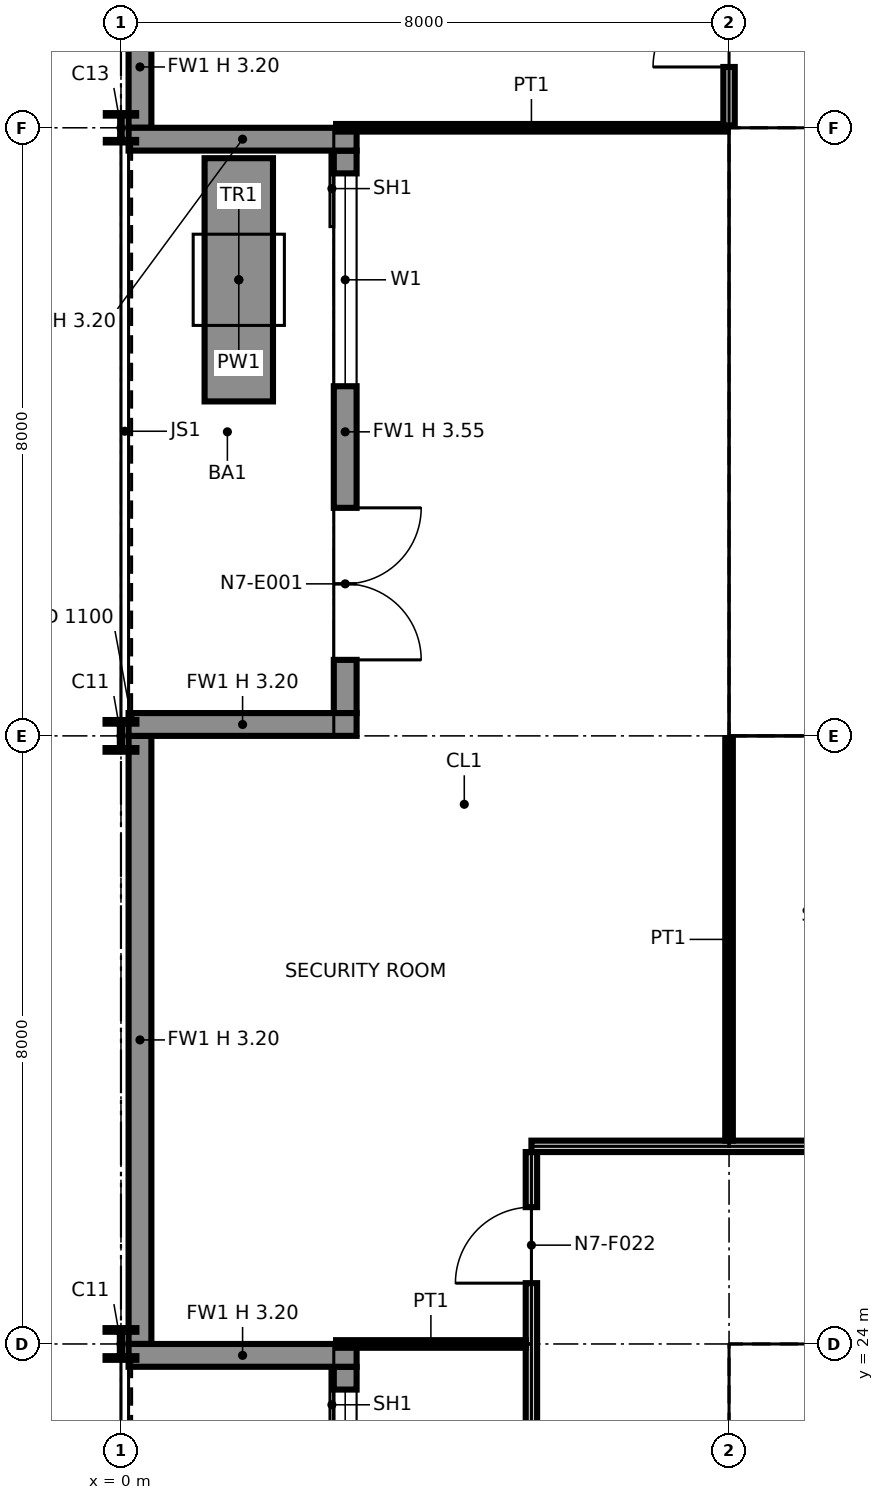
"""IFC4 building model, lengths in metres.
Left out: names, types, materials, properties, quantities, classifications, styles, units other than length and angle.
Written with IfcOpenShell. Run it as: python <this file> out.ifc"""

import sys

from ifc_helpers import new_model, si_unit, direction, frame, frame_2d, origin, origin_2d, place, context, subcontext, project, spatial, polyline, rectangle, i_section, outline, extrude, element, fill, save


model = new_model("IFC4")
c1 = context("Model", 3, precision=1e-05, world=origin(), true_north=direction((0.0, 1.0)))
c2 = subcontext(c1, "Body", "Model", "MODEL_VIEW")
j1 = project(units=[si_unit("LENGTHUNIT", "METRE"), si_unit("PLANEANGLEUNIT", "RADIAN")], contexts=[c1])
p1 = place(None, origin())
s1 = spatial("IfcSite", under=j1, at=p1, CompositionType="ELEMENT")
p2 = place(p1, origin())
s2 = spatial("IfcBuilding", under=s1, at=p2, CompositionType="ELEMENT")
p3 = place(p2, frame((0.0, 0.0, 109.6)))
s3 = spatial("IfcBuildingStorey", under=s2, at=p3, CompositionType="ELEMENT", Elevation=109.6)
for number, where, z_axis, x_axis in (
    (1, (0.0, 24.0, 0.0), (0.0, 0.0, 1.0), (1.0, 0.0, 0.0)),
    (2, (0.0, 32.0, 0.0), (0.0, 0.0, 1.0), (1.0, 0.0, 0.0)),
):
    element("IfcColumn", number, at=place(p3, frame(where, z_axis=z_axis, x_axis=x_axis)), inside=s3, PredefinedType="COLUMN", context=c2, shape_type="SweptSolid", body=[
        extrude(i_section(OverallWidth=0.406, OverallDepth=0.417, WebThickness=0.03, FlangeThickness=0.048, at=origin_2d()), origin(), (0.0, 0.0, 1.0), 4.15),
    ])
p4 = place(p3, frame((0.0, 40.0, 0.0), z_axis=(0.0, 0.0, 1.0), x_axis=(1.0, 0.0, 0.0)))
e3 = element("IfcColumn", 3, at=p4, inside=s3, PredefinedType="COLUMN", context=c2, shape_type="SweptSolid", body=[
    extrude(i_section(OverallWidth=0.399, OverallDepth=0.386, WebThickness=0.021, FlangeThickness=0.033, at=origin_2d()), origin(), (0.0, 0.0, 1.0), 4.15),
])
p5 = place(p3, frame((8.0, 24.0, 0.0), z_axis=(0.0, 0.0, 1.0), x_axis=(1.0, 0.0, 0.0)))
e4 = element("IfcColumn", 4, at=p5, inside=s3, PredefinedType="COLUMN", context=c2, shape_type="SweptSolid", body=[
    extrude(i_section(OverallWidth=0.411, OverallDepth=0.434, WebThickness=0.036, FlangeThickness=0.057, at=origin_2d()), origin(), (0.0, 0.0, 1.0), 4.15),
])
for number, where, z_axis, x_axis in (
    (5, (8.0, 32.0, 0.0), (0.0, 0.0, 1.0), (1.0, 0.0, 0.0)),
    (6, (8.0, 40.0, 0.0), (0.0, 0.0, 1.0), (1.0, 0.0, 0.0)),
):
    element("IfcColumn", number, at=place(p3, frame(where, z_axis=z_axis, x_axis=x_axis)), inside=s3, PredefinedType="COLUMN", context=c2, shape_type="SweptSolid", body=[
        extrude(i_section(OverallWidth=0.373, OverallDepth=0.368, WebThickness=0.015, FlangeThickness=0.024, at=origin_2d()), origin(), (0.0, 0.0, 1.0), 4.15),
    ])
p6 = place(p3, frame((0.25, 41.6, 0.0), z_axis=(0.0, 0.0, 1.0), x_axis=(0.0, -1.0, 0.0)))
e7 = element("IfcWall", 7, at=p6, inside=s3, PredefinedType="SOLIDWALL", context=c2, shape_type="SweptSolid", body=[
    extrude(rectangle(XDim=1.6, YDim=0.3, at=frame_2d((0.8, 0.0))), origin(), (0.0, 0.0, 1.0), 3.199),
])
p7 = place(p3, frame((2.95, 39.7, 0.0), z_axis=(0.0, 0.0, 1.0), x_axis=(0.0, -1.0, 0.0)))
e8 = element("IfcWall", 8, at=p7, inside=s3, PredefinedType="SOLIDWALL", context=c2, shape_type="SweptSolid", body=[
    extrude(rectangle(XDim=7.4, YDim=0.3, at=frame_2d((3.7, 0.0))), origin(), (0.0, 0.0, 1.0), 3.547),
])
p8 = place(p7, frame((0.3, 0.0, 0.9)))
e9 = element("IfcOpeningElement", 9, at=p8, cuts=e8, PredefinedType="OPENING", context=c2, shape_type="SweptSolid", body=[
    extrude(rectangle(XDim=2.8, YDim=2.2, at=frame_2d((1.4, 1.1))), frame((0.0, 0.16, 0.0), z_axis=(0.0, -1.0, 0.0), x_axis=(1.0, 0.0, 0.0)), (0.0, 0.0, 1.0), 0.32),
])
p9 = place(p7, frame((4.7, 0.0, 0.0)))
e10 = element("IfcOpeningElement", 10, at=p9, cuts=e8, PredefinedType="OPENING", context=c2, shape_type="SweptSolid", body=[
    extrude(rectangle(XDim=2.0, YDim=2.4, at=frame_2d((1.0, 1.2))), frame((0.0, 0.16, 0.0), z_axis=(0.0, -1.0, 0.0), x_axis=(1.0, 0.0, 0.0)), (0.0, 0.0, 1.0), 0.32),
])
for number, where, z_axis, x_axis in (
    (11, (0.1, 39.85, 0.0), (0.0, 0.0, 1.0), (1.0, 0.0, 0.0)),
    (12, (0.1, 32.15, 0.0), (0.0, 0.0, 1.0), (1.0, 0.0, 0.0)),
):
    element("IfcWall", number, at=place(p3, frame(where, z_axis=z_axis, x_axis=x_axis)), inside=s3, PredefinedType="SOLIDWALL", context=c2, shape_type="SweptSolid", body=[
        extrude(rectangle(XDim=3.0, YDim=0.3, at=frame_2d((1.5, 0.0))), origin(), (0.0, 0.0, 1.0), 3.199),
    ])
p10 = place(p3, frame((0.25, 32.0, 0.0), z_axis=(0.0, 0.0, 1.0), x_axis=(0.0, -1.0, 0.0)))
e13 = element("IfcWall", 13, at=p10, inside=s3, PredefinedType="SOLIDWALL", context=c2, shape_type="SweptSolid", body=[
    extrude(rectangle(XDim=8.0, YDim=0.3, at=frame_2d((4.0, 0.0))), origin(), (0.0, 0.0, 1.0), 3.199),
])
p11 = place(p3, frame((2.95, 23.7, 0.0), z_axis=(0.0, 0.0, 1.0), x_axis=(0.0, -1.0, 0.0)))
e14 = element("IfcWall", 14, at=p11, inside=s3, PredefinedType="SOLIDWALL", context=c2, shape_type="SweptSolid", body=[
    extrude(rectangle(XDim=7.4, YDim=0.3, at=frame_2d((3.7, 0.0))), origin(), (0.0, 0.0, 1.0), 3.547),
])
p12 = place(p11, frame((0.3, 0.0, 0.9)))
e15 = element("IfcOpeningElement", 15, at=p12, cuts=e14, PredefinedType="OPENING", context=c2, shape_type="SweptSolid", body=[
    extrude(rectangle(XDim=2.8, YDim=2.2, at=frame_2d((1.4, 1.1))), frame((0.0, 0.16, 0.0), z_axis=(0.0, -1.0, 0.0), x_axis=(1.0, 0.0, 0.0)), (0.0, 0.0, 1.0), 0.32),
])
p13 = place(p11, frame((4.7, 0.0, 0.0)))
e16 = element("IfcOpeningElement", 16, at=p13, cuts=e14, PredefinedType="OPENING", context=c2, shape_type="SweptSolid", body=[
    extrude(rectangle(XDim=2.0, YDim=2.4, at=frame_2d((1.0, 1.2))), frame((0.0, 0.16, 0.0), z_axis=(0.0, -1.0, 0.0), x_axis=(1.0, 0.0, 0.0)), (0.0, 0.0, 1.0), 0.32),
])
p14 = place(p3, frame((0.1, 23.85, 0.0), z_axis=(0.0, 0.0, 1.0), x_axis=(1.0, 0.0, 0.0)))
e17 = element("IfcWall", 17, at=p14, inside=s3, PredefinedType="SOLIDWALL", context=c2, shape_type="SweptSolid", body=[
    extrude(rectangle(XDim=3.0, YDim=0.3, at=frame_2d((1.5, 0.0))), origin(), (0.0, 0.0, 1.0), 3.199),
])
p15 = place(p3, frame((1.55, 39.6, 0.0), z_axis=(0.0, 0.0, 1.0), x_axis=(0.0, -1.0, 0.0)))
e18 = element("IfcWall", 18, at=p15, inside=s3, PredefinedType="SOLIDWALL", context=c2, shape_type="SweptSolid", body=[
    extrude(rectangle(XDim=3.2, YDim=0.9, at=frame_2d((1.6, 0.0))), origin(), (0.0, 0.0, 1.0), 0.6),
])
p16 = place(p3, frame((8.75, 8.85, 0.0), z_axis=(0.0, 0.0, 1.0), x_axis=(0.0, 1.0, 0.0)))
e19 = element("IfcWall", 19, at=p16, inside=s3, PredefinedType="PARTITIONING", context=c2, shape_type="SweptSolid", body=[
    extrude(outline(polyline([(0.0, 0.0), (14.3, 0.0), (14.3, 4.15), (10.269, 4.15), (10.268, 3.542), (10.032, 3.542), (10.031, 4.15), (7.289, 4.15), (7.288, 3.382), (7.012, 3.382), (7.011, 4.15), (0.0, 4.15), (0.0, 0.0)])), frame((0.0, 0.1, 0.0), z_axis=(0.0, -1.0, 0.0), x_axis=(1.0, 0.0, 0.0)), (0.0, 0.0, 1.0), 0.2),
])
p17 = place(p16, frame((8.3, 0.0, 0.0)))
e20 = element("IfcOpeningElement", 20, at=p17, cuts=e19, PredefinedType="OPENING", context=c2, shape_type="SweptSolid", body=[
    extrude(rectangle(XDim=1.8, YDim=2.1, at=frame_2d((0.9, 1.05))), frame((0.0, 0.11, 0.0), z_axis=(0.0, -1.0, 0.0), x_axis=(1.0, 0.0, 0.0)), (0.0, 0.0, 1.0), 0.22),
])
p18 = place(p3, frame((8.65, 23.25, 0.0), z_axis=(0.0, 0.0, 1.0), x_axis=(1.0, 0.0, 0.0)))
e21 = element("IfcWall", 21, at=p18, inside=s3, PredefinedType="PARTITIONING", context=c2, shape_type="SweptSolid", body=[
    extrude(outline(polyline([(0.0, 0.0), (14.7, 0.0), (14.7, 4.15), (7.489, 4.15), (7.488, 3.382), (7.212, 3.382), (7.211, 4.15), (0.0, 4.15), (0.0, 0.0)])), frame((0.0, 0.1, 0.0), z_axis=(0.0, -1.0, 0.0), x_axis=(1.0, 0.0, 0.0)), (0.0, 0.0, 1.0), 0.2),
])
p19 = place(p3, frame((8.65, 32.75, 0.0), z_axis=(0.0, 0.0, 1.0), x_axis=(1.0, 0.0, 0.0)))
e22 = element("IfcWall", 22, at=p19, inside=s3, PredefinedType="PARTITIONING", context=c2, shape_type="SweptSolid", body=[
    extrude(outline(polyline([(0.0, 0.0), (14.7, 0.0), (14.7, 4.15), (7.489, 4.15), (7.488, 3.382), (7.212, 3.382), (7.211, 4.15), (0.0, 4.15), (0.0, 0.0)])), frame((0.0, 0.1, 0.0), z_axis=(0.0, -1.0, 0.0), x_axis=(1.0, 0.0, 0.0)), (0.0, 0.0, 1.0), 0.2),
])
p20 = place(p19, frame((4.05, 0.0, 0.0)))
e23 = element("IfcOpeningElement", 23, at=p20, cuts=e22, PredefinedType="OPENING", context=c2, shape_type="SweptSolid", body=[
    extrude(rectangle(XDim=1.8, YDim=2.1, at=frame_2d((0.9, 1.05))), frame((0.0, 0.11, 0.0), z_axis=(0.0, -1.0, 0.0), x_axis=(1.0, 0.0, 0.0)), (0.0, 0.0, 1.0), 0.22),
])
p21 = place(p19, frame((8.35, 0.0, 0.0)))
e24 = element("IfcOpeningElement", 24, at=p21, cuts=e22, PredefinedType="OPENING", context=c2, shape_type="SweptSolid", body=[
    extrude(rectangle(XDim=1.4, YDim=2.1, at=frame_2d((0.7, 1.05))), frame((0.0, 0.11, 0.0), z_axis=(0.0, -1.0, 0.0), x_axis=(1.0, 0.0, 0.0)), (0.0, 0.0, 1.0), 0.22),
])
p22 = place(p19, frame((10.85, 0.0, 0.0)))
e25 = element("IfcOpeningElement", 25, at=p22, cuts=e22, PredefinedType="OPENING", context=c2, shape_type="SweptSolid", body=[
    extrude(rectangle(XDim=1.4, YDim=2.1, at=frame_2d((0.7, 1.05))), frame((0.0, 0.11, 0.0), z_axis=(0.0, -1.0, 0.0), x_axis=(1.0, 0.0, 0.0)), (0.0, 0.0, 1.0), 0.22),
])
p23 = place(p3, frame((8.75, 32.85, 0.0), z_axis=(0.0, 0.0, 1.0), x_axis=(0.0, 1.0, 0.0)))
e26 = element("IfcWall", 26, at=p23, inside=s3, PredefinedType="PARTITIONING", context=c2, shape_type="SweptSolid", body=[
    extrude(outline(polyline([(0.0, 0.0), (6.3, 0.0), (6.3, 4.15), (3.269, 4.15), (3.268, 3.542), (3.032, 3.542), (3.031, 4.15), (0.0, 4.15), (0.0, 0.0)])), frame((0.0, 0.1, 0.0), z_axis=(0.0, -1.0, 0.0), x_axis=(1.0, 0.0, 0.0)), (0.0, 0.0, 1.0), 0.2),
])
p24 = place(p3, frame((8.65, 39.25, 0.0), z_axis=(0.0, 0.0, 1.0), x_axis=(1.0, 0.0, 0.0)))
e27 = element("IfcWall", 27, at=p24, inside=s3, PredefinedType="PARTITIONING", context=c2, shape_type="SweptSolid", body=[
    extrude(outline(polyline([(0.0, 0.0), (14.7, 0.0), (14.7, 4.15), (7.489, 4.15), (7.488, 3.382), (7.212, 3.382), (7.211, 4.15), (0.0, 4.15), (0.0, 0.0)])), frame((0.0, 0.1, 0.0), z_axis=(0.0, -1.0, 0.0), x_axis=(1.0, 0.0, 0.0)), (0.0, 0.0, 1.0), 0.2),
])
p25 = place(p3, frame((8.85, 34.875, 0.0), z_axis=(0.0, 0.0, 1.0), x_axis=(1.0, 0.0, 0.0)))
e28 = element("IfcWall", 28, at=p25, inside=s3, PredefinedType="PARTITIONING", context=c2, shape_type="SweptSolid", body=[
    extrude(rectangle(XDim=2.1, YDim=0.15, at=frame_2d((1.05, 0.0))), origin(), (0.0, 0.0, 1.0), 4.15),
])
p26 = place(p3, frame((8.85, 36.5, 0.0), z_axis=(0.0, 0.0, 1.0), x_axis=(1.0, 0.0, 0.0)))
e29 = element("IfcWall", 29, at=p26, inside=s3, PredefinedType="PARTITIONING", context=c2, shape_type="SweptSolid", body=[
    extrude(outline(polyline([(0.0, 0.0), (7.45, 0.0), (7.45, 4.15), (7.289, 4.15), (7.288, 3.382), (7.012, 3.382), (7.011, 4.15), (0.0, 4.15), (0.0, 0.0)])), frame((0.0, 0.1, 0.0), z_axis=(0.0, -1.0, 0.0), x_axis=(1.0, 0.0, 0.0)), (0.0, 0.0, 1.0), 0.2),
])
p27 = place(p3, frame((5.4, 5.4, 0.0), z_axis=(0.0, 0.0, 1.0), x_axis=(0.0, 1.0, 0.0)))
e30 = element("IfcWall", 30, at=p27, inside=s3, PredefinedType="PARTITIONING", context=c2, shape_type="SweptSolid", body=[
    extrude(rectangle(XDim=21.125, YDim=0.15, at=frame_2d((10.562, 0.0))), origin(), (0.0, 0.0, 1.0), 3.194),
])
p28 = place(p27, frame((6.1, 0.0, 0.0)))
e31 = element("IfcOpeningElement", 31, at=p28, cuts=e30, PredefinedType="OPENING", context=c2, shape_type="SweptSolid", body=[
    extrude(rectangle(XDim=1.0, YDim=2.1, at=frame_2d((0.5, 1.05))), frame((0.0, 0.085, 0.0), z_axis=(0.0, -1.0, 0.0), x_axis=(1.0, 0.0, 0.0)), (0.0, 0.0, 1.0), 0.17),
])
p29 = place(p27, frame((11.825, 0.0, 0.0)))
e32 = element("IfcOpeningElement", 32, at=p29, cuts=e30, PredefinedType="OPENING", context=c2, shape_type="SweptSolid", body=[
    extrude(rectangle(XDim=1.0, YDim=2.1, at=frame_2d((0.5, 1.05))), frame((0.0, 0.085, 0.0), z_axis=(0.0, -1.0, 0.0), x_axis=(1.0, 0.0, 0.0)), (0.0, 0.0, 1.0), 0.17),
])
p30 = place(p27, frame((16.1, 0.0, 0.0)))
e33 = element("IfcOpeningElement", 33, at=p30, cuts=e30, PredefinedType="OPENING", context=c2, shape_type="SweptSolid", body=[
    extrude(rectangle(XDim=1.0, YDim=2.1, at=frame_2d((0.5, 1.05))), frame((0.0, 0.085, 0.0), z_axis=(0.0, -1.0, 0.0), x_axis=(1.0, 0.0, 0.0)), (0.0, 0.0, 1.0), 0.17),
])
p31 = place(p27, frame((19.4, 0.0, 0.0)))
e34 = element("IfcOpeningElement", 34, at=p31, cuts=e30, PredefinedType="OPENING", context=c2, shape_type="SweptSolid", body=[
    extrude(rectangle(XDim=1.0, YDim=2.1, at=frame_2d((0.5, 1.05))), frame((0.0, 0.085, 0.0), z_axis=(0.0, -1.0, 0.0), x_axis=(1.0, 0.0, 0.0)), (0.0, 0.0, 1.0), 0.17),
])
p32 = place(p3, frame((2.83, 24.0, 0.0), z_axis=(0.0, 0.0, 1.0), x_axis=(1.0, 0.0, 0.0)))
e35 = element("IfcWall", 35, at=p32, inside=s3, PredefinedType="PARTITIONING", context=c2, shape_type="SweptSolid", body=[
    extrude(rectangle(XDim=2.495, YDim=0.1, at=frame_2d((1.248, 0.0))), origin(), (0.0, 0.0, 1.0), 3.194),
])
p33 = place(p3, frame((5.4, 26.6, 0.0), z_axis=(0.0, 0.0, 1.0), x_axis=(1.0, 0.0, 0.0)))
e36 = element("IfcWall", 36, at=p33, inside=s3, PredefinedType="PARTITIONING", context=c2, shape_type="SweptSolid", body=[
    extrude(rectangle(XDim=18.525, YDim=0.15, at=frame_2d((9.263, 0.0))), origin(), (0.0, 0.0, 1.0), 3.194),
])
p34 = place(p33, frame((6.1, 0.0, 0.0)))
e37 = element("IfcOpeningElement", 37, at=p34, cuts=e36, PredefinedType="OPENING", context=c2, shape_type="SweptSolid", body=[
    extrude(rectangle(XDim=1.0, YDim=2.1, at=frame_2d((0.5, 1.05))), frame((0.0, 0.085, 0.0), z_axis=(0.0, -1.0, 0.0), x_axis=(1.0, 0.0, 0.0)), (0.0, 0.0, 1.0), 0.17),
])
p35 = place(p3, frame((8.0, 26.675, 0.0), z_axis=(0.0, 0.0, 1.0), x_axis=(0.0, 1.0, 0.0)))
e38 = element("IfcWall", 38, at=p35, inside=s3, PredefinedType="PARTITIONING", context=c2, shape_type="SweptSolid", body=[
    extrude(rectangle(XDim=5.295, YDim=0.1, at=frame_2d((2.647, 0.0))), origin(), (0.0, 0.0, 1.0), 3.194),
])
p36 = place(p3, frame((2.83, 40.0, 0.0), z_axis=(0.0, 0.0, 1.0), x_axis=(1.0, 0.0, 0.0)))
e39 = element("IfcWall", 39, at=p36, inside=s3, PredefinedType="PARTITIONING", context=c2, shape_type="SweptSolid", body=[
    extrude(rectangle(XDim=5.14, YDim=0.1, at=frame_2d((2.57, 0.0))), origin(), (0.0, 0.0, 1.0), 3.194),
])
p37 = place(p3, frame((8.0, 40.03, 0.0), z_axis=(0.0, 0.0, 1.0), x_axis=(0.0, 1.0, 0.0)))
e40 = element("IfcWall", 40, at=p37, inside=s3, PredefinedType="PARTITIONING", context=c2, shape_type="SweptSolid", body=[
    extrude(rectangle(XDim=2.495, YDim=0.15, at=frame_2d((1.248, 0.0))), origin(), (0.0, 0.0, 1.0), 3.194),
])
p38 = place(p37, frame((0.77, 0.0, 0.0)))
e41 = element("IfcOpeningElement", 41, at=p38, cuts=e40, PredefinedType="OPENING", context=c2, shape_type="SweptSolid", body=[
    extrude(rectangle(XDim=1.0, YDim=2.1, at=frame_2d((0.5, 1.05))), frame((0.0, 0.085, 0.0), z_axis=(0.0, -1.0, 0.0), x_axis=(1.0, 0.0, 0.0)), (0.0, 0.0, 1.0), 0.17),
])
p39 = place(p8, origin())
e42 = element("IfcWindow", 42, at=p39, inside=s3, PartitioningType="SINGLE_PANEL", PredefinedType="WINDOW", context=c2, shape_type="SweptSolid", body=[
    extrude(rectangle(XDim=2.8, YDim=2.2, at=frame_2d((1.4, 1.1))), frame((0.0, 0.03, 0.0), z_axis=(0.0, -1.0, 0.0), x_axis=(1.0, 0.0, 0.0)), (0.0, 0.0, 1.0), 0.06),
])
fill(e9, e42)
p40 = place(p9, origin())
e43 = element("IfcDoor", 43, at=p40, inside=s3, OperationType="DOUBLE_DOOR_SINGLE_SWING", PredefinedType="DOOR", context=c2, shape_type="SweptSolid", body=[
    extrude(rectangle(XDim=2.0, YDim=2.4, at=frame_2d((1.0, 1.2))), frame((0.0, 0.025, 0.0), z_axis=(0.0, -1.0, 0.0), x_axis=(1.0, 0.0, 0.0)), (0.0, 0.0, 1.0), 0.05),
])
fill(e10, e43)
p41 = place(p12, origin())
e44 = element("IfcWindow", 44, at=p41, inside=s3, PartitioningType="SINGLE_PANEL", PredefinedType="WINDOW", context=c2, shape_type="SweptSolid", body=[
    extrude(rectangle(XDim=2.8, YDim=2.2, at=frame_2d((1.4, 1.1))), frame((0.0, 0.03, 0.0), z_axis=(0.0, -1.0, 0.0), x_axis=(1.0, 0.0, 0.0)), (0.0, 0.0, 1.0), 0.06),
])
fill(e15, e44)
p42 = place(p31, origin())
e45 = element("IfcDoor", 45, at=p42, inside=s3, OperationType="SINGLE_SWING_LEFT", PredefinedType="DOOR", context=c2, shape_type="SweptSolid", body=[
    extrude(rectangle(XDim=1.0, YDim=2.1, at=frame_2d((0.5, 1.05))), frame((0.0, 0.025, 0.0), z_axis=(0.0, -1.0, 0.0), x_axis=(1.0, 0.0, 0.0)), (0.0, 0.0, 1.0), 0.05),
])
fill(e34, e45)
p43 = place(p38, origin())
e46 = element("IfcDoor", 46, at=p43, inside=s3, OperationType="SINGLE_SWING_LEFT", PredefinedType="DOOR", context=c2, shape_type="SweptSolid", body=[
    extrude(rectangle(XDim=1.0, YDim=2.1, at=frame_2d((0.5, 1.05))), frame((0.0, 0.025, 0.0), z_axis=(0.0, -1.0, 0.0), x_axis=(1.0, 0.0, 0.0)), (0.0, 0.0, 1.0), 0.05),
])
fill(e41, e46)
save(model, sys.argv[1])
